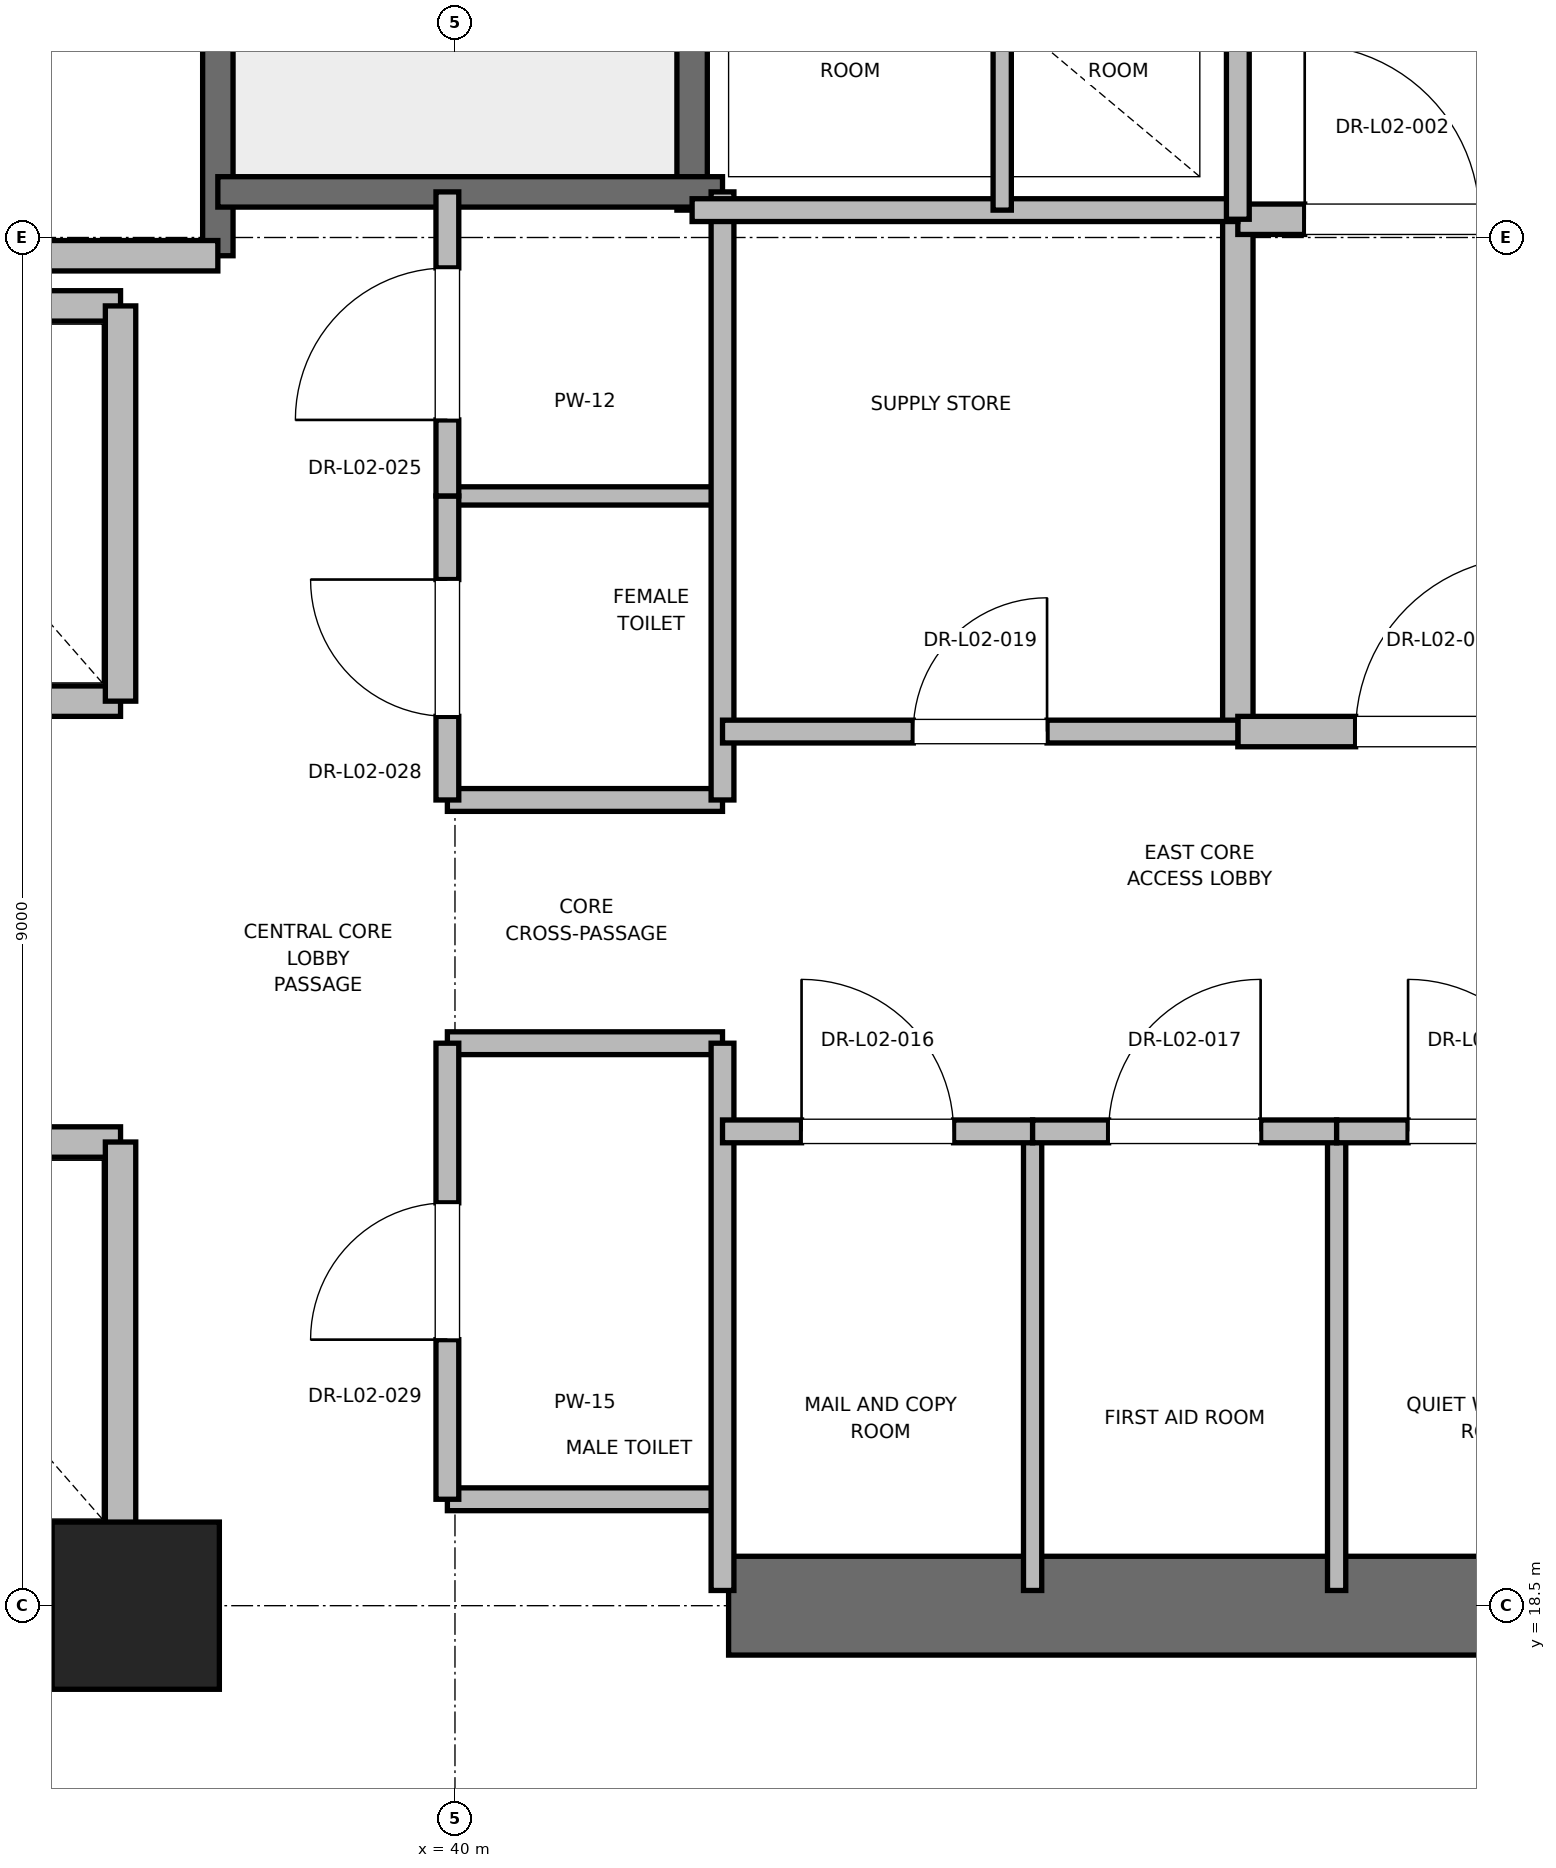
"""IFC4 building model, lengths in metres.
Left out: names, types, materials, properties, quantities, classifications, styles, units other than length and angle.
Written with IfcOpenShell. Run it as: python <this file> out.ifc"""

import sys

from ifc_helpers import new_model, si_unit, direction, frame, frame_2d, origin, origin_2d, place, context, subcontext, project, spatial, rectangle, extrude, element, fill, save


model = new_model("IFC4")
c1 = context("Model", 3, precision=1e-05, world=origin(), true_north=direction((0.0, 1.0)))
c2 = subcontext(c1, "Body", "Model", "MODEL_VIEW")
j1 = project(units=[si_unit("LENGTHUNIT", "METRE"), si_unit("PLANEANGLEUNIT", "RADIAN")], contexts=[c1])
p1 = place(None, origin())
s1 = spatial("IfcSite", under=j1, at=p1, CompositionType="ELEMENT")
p2 = place(p1, origin())
s2 = spatial("IfcBuilding", under=s1, at=p2, CompositionType="ELEMENT")
p3 = place(p2, frame((0.0, 0.0, 11.2)))
s3 = spatial("IfcBuildingStorey", under=s2, at=p3, CompositionType="ELEMENT", Elevation=11.2)
p4 = place(p3, frame((37.9, 18.5, 0.0), z_axis=(0.0, 0.0, 1.0), x_axis=(1.0, 0.0, 0.0)))
e1 = element("IfcColumn", 1, at=p4, inside=s3, PredefinedType="PILASTER", context=c2, shape_type="SweptSolid", body=[
    extrude(rectangle(XDim=1.1, YDim=1.1, at=origin_2d()), origin(), (0.0, 0.0, 1.0), 5.2),
])
for number, where, z_axis, x_axis in (
    (2, (29.0, 18.5, 0.0), (0.0, 0.0, 1.0), (1.0, 0.0, 0.0)),
    (3, (41.8, 18.5, 0.0), (0.0, 0.0, 1.0), (1.0, 0.0, 0.0)),
):
    element("IfcWall", number, at=place(p3, frame(where, z_axis=z_axis, x_axis=x_axis)), inside=s3, PredefinedType="SHEAR", context=c2, shape_type="SweptSolid", body=[
        extrude(rectangle(XDim=9.2, YDim=0.65, at=frame_2d((4.6, 0.0))), origin(), (0.0, 0.0, 1.0), 4.92),
    ])
p5 = place(p3, frame((38.44, 27.38, 0.0), z_axis=(0.0, 0.0, 1.0), x_axis=(0.0, 1.0, 0.0)))
e4 = element("IfcWall", 4, at=p5, inside=s3, PredefinedType="SOLIDWALL", context=c2, shape_type="SweptSolid", body=[
    extrude(rectangle(XDim=8.87, YDim=0.2, at=frame_2d((4.435, 0.0))), origin(), (0.0, 0.0, 1.0), 4.92),
])
p6 = place(p3, frame((41.56, 27.68, 0.0), z_axis=(0.0, 0.0, 1.0), x_axis=(0.0, 1.0, 0.0)))
e5 = element("IfcWall", 5, at=p6, inside=s3, PredefinedType="SOLIDWALL", context=c2, shape_type="SweptSolid", body=[
    extrude(rectangle(XDim=8.57, YDim=0.2, at=frame_2d((4.285, 0.0))), origin(), (0.0, 0.0, 1.0), 4.92),
])
p7 = place(p3, frame((38.44, 27.8, 0.0), z_axis=(0.0, 0.0, 1.0), x_axis=(1.0, 0.0, 0.0)))
e6 = element("IfcWall", 6, at=p7, inside=s3, PredefinedType="SOLIDWALL", context=c2, shape_type="SweptSolid", body=[
    extrude(rectangle(XDim=3.32, YDim=0.2, at=frame_2d((1.66, 0.0))), origin(), (0.0, 0.0, 1.0), 4.92),
])
p8 = place(p3, frame((32.82, 27.38, 0.0), z_axis=(0.0, 0.0, 1.0), x_axis=(1.0, 0.0, 0.0)))
e7 = element("IfcWall", 7, at=p8, inside=s3, PredefinedType="PARTITIONING", context=c2, shape_type="SweptSolid", body=[
    extrude(rectangle(XDim=5.62, YDim=0.2, at=frame_2d((2.81, 0.0))), origin(), (0.0, 0.0, 1.0), 4.92),
])
p9 = place(p3, frame((45.15, 24.25, 0.0), z_axis=(0.0, 0.0, 1.0), x_axis=(0.0, 1.0, 0.0)))
e8 = element("IfcWall", 8, at=p9, inside=s3, PredefinedType="PARTITIONING", context=c2, shape_type="SweptSolid", body=[
    extrude(rectangle(XDim=3.37, YDim=0.2, at=frame_2d((1.685, 0.0))), origin(), (0.0, 0.0, 1.0), 4.92),
])
p10 = place(p3, frame((45.15, 24.25, 0.0), z_axis=(0.0, 0.0, 1.0), x_axis=(1.0, 0.0, 0.0)))
e9 = element("IfcWall", 9, at=p10, inside=s3, PredefinedType="PARTITIONING", context=c2, shape_type="SweptSolid", body=[
    extrude(rectangle(XDim=2.7, YDim=0.2, at=frame_2d((1.35, 0.0))), origin(), (0.0, 0.0, 1.0), 4.92),
])
p11 = place(p10, frame((0.775, 0.0, 0.0)))
e10 = element("IfcOpeningElement", 10, at=p11, cuts=e9, PredefinedType="OPENING", context=c2, shape_type="SweptSolid", body=[
    extrude(rectangle(XDim=1.15, YDim=2.2, at=frame_2d((0.575, 1.1))), frame((0.0, 0.1, 0.0), z_axis=(0.0, -1.0, 0.0), x_axis=(1.0, 0.0, 0.0)), (0.0, 0.0, 1.0), 0.2),
])
p12 = place(p3, frame((45.15, 27.62, 0.0), z_axis=(0.0, 0.0, 1.0), x_axis=(1.0, 0.0, 0.0)))
e11 = element("IfcWall", 11, at=p12, inside=s3, PredefinedType="PARTITIONING", context=c2, shape_type="SweptSolid", body=[
    extrude(rectangle(XDim=2.03, YDim=0.2, at=frame_2d((1.015, 0.0))), origin(), (0.0, 0.0, 1.0), 4.92),
])
p13 = place(p12, frame((0.44, 0.0, 0.0)))
e12 = element("IfcOpeningElement", 12, at=p13, cuts=e11, PredefinedType="OPENING", context=c2, shape_type="SweptSolid", body=[
    extrude(rectangle(XDim=1.15, YDim=2.2, at=frame_2d((0.575, 1.1))), frame((0.0, 0.1, 0.0), z_axis=(0.0, -1.0, 0.0), x_axis=(1.0, 0.0, 0.0)), (0.0, 0.0, 1.0), 0.2),
])
p14 = place(p3, frame((35.5, 18.95, 0.0), z_axis=(0.0, 0.0, 1.0), x_axis=(1.0, 0.0, 0.0)))
e13 = element("IfcWall", 13, at=p14, inside=s3, PredefinedType="SOLIDWALL", context=c2, shape_type="SweptSolid", body=[
    extrude(rectangle(XDim=2.3, YDim=0.2, at=frame_2d((1.15, 0.0))), origin(), (0.0, 0.0, 1.0), 3.7),
])
p15 = place(p3, frame((37.8, 21.55, 0.0), z_axis=(0.0, 0.0, 1.0), x_axis=(-1.0, 0.0, 0.0)))
e14 = element("IfcWall", 14, at=p15, inside=s3, PredefinedType="SOLIDWALL", context=c2, shape_type="SweptSolid", body=[
    extrude(rectangle(XDim=2.3, YDim=0.2, at=frame_2d((1.15, 0.0))), origin(), (0.0, 0.0, 1.0), 4.92),
])
p16 = place(p3, frame((37.8, 18.95, 0.0), z_axis=(0.0, 0.0, 1.0), x_axis=(0.0, 1.0, 0.0)))
e15 = element("IfcWall", 15, at=p16, inside=s3, PredefinedType="SOLIDWALL", context=c2, shape_type="SweptSolid", body=[
    extrude(rectangle(XDim=2.6, YDim=0.2, at=frame_2d((1.3, 0.0))), origin(), (0.0, 0.0, 1.0), 3.7),
])
for number, where, z_axis, x_axis in (
    (16, (35.5, 24.45, 0.0), (0.0, 0.0, 1.0), (1.0, 0.0, 0.0)),
    (17, (37.8, 27.05, 0.0), (0.0, 0.0, 1.0), (-1.0, 0.0, 0.0)),
):
    element("IfcWall", number, at=place(p3, frame(where, z_axis=z_axis, x_axis=x_axis)), inside=s3, PredefinedType="SOLIDWALL", context=c2, shape_type="SweptSolid", body=[
        extrude(rectangle(XDim=2.3, YDim=0.2, at=frame_2d((1.15, 0.0))), origin(), (0.0, 0.0, 1.0), 4.92),
    ])
p17 = place(p3, frame((37.8, 24.45, 0.0), z_axis=(0.0, 0.0, 1.0), x_axis=(0.0, 1.0, 0.0)))
e18 = element("IfcWall", 18, at=p17, inside=s3, PredefinedType="SOLIDWALL", context=c2, shape_type="SweptSolid", body=[
    extrude(rectangle(XDim=2.6, YDim=0.2, at=frame_2d((1.3, 0.0))), origin(), (0.0, 0.0, 1.0), 4.92),
])
for number, where, z_axis, x_axis in (
    (19, (39.95, 19.2, 0.0), (0.0, 0.0, 1.0), (1.0, 0.0, 0.0)),
    (20, (39.95, 22.2, 0.0), (0.0, 0.0, 1.0), (1.0, 0.0, 0.0)),
    (21, (39.95, 23.8, 0.0), (0.0, 0.0, 1.0), (1.0, 0.0, 0.0)),
):
    element("IfcWall", number, at=place(p3, frame(where, z_axis=z_axis, x_axis=x_axis)), inside=s3, PredefinedType="PARTITIONING", context=c2, shape_type="SweptSolid", body=[
        extrude(rectangle(XDim=1.81, YDim=0.15, at=frame_2d((0.905, 0.0))), origin(), (0.0, 0.0, 1.0), 2.85),
    ])
p18 = place(p3, frame((39.95, 25.8, 0.0), z_axis=(0.0, 0.0, 1.0), x_axis=(1.0, 0.0, 0.0)))
e22 = element("IfcWall", 22, at=p18, inside=s3, PredefinedType="PARTITIONING", context=c2, shape_type="SweptSolid", body=[
    extrude(rectangle(XDim=1.81, YDim=0.12, at=frame_2d((0.905, 0.0))), origin(), (0.0, 0.0, 1.0), 2.85),
])
p19 = place(p3, frame((41.76, 18.6, 0.0), z_axis=(0.0, 0.0, 1.0), x_axis=(0.0, 1.0, 0.0)))
e23 = element("IfcWall", 23, at=p19, inside=s3, PredefinedType="PARTITIONING", context=c2, shape_type="SweptSolid", body=[
    extrude(rectangle(XDim=3.6, YDim=0.15, at=frame_2d((1.8, 0.0))), origin(), (0.0, 0.0, 1.0), 2.85),
])
p20 = place(p3, frame((41.76, 23.8, 0.0), z_axis=(0.0, 0.0, 1.0), x_axis=(0.0, 1.0, 0.0)))
e24 = element("IfcWall", 24, at=p20, inside=s3, PredefinedType="PARTITIONING", context=c2, shape_type="SweptSolid", body=[
    extrude(rectangle(XDim=4.0, YDim=0.15, at=frame_2d((2.0, 0.0))), origin(), (0.0, 0.0, 1.0), 2.85),
])
p21 = place(p3, frame((39.95, 19.2, 0.0), z_axis=(0.0, 0.0, 1.0), x_axis=(0.0, 1.0, 0.0)))
e25 = element("IfcWall", 25, at=p21, inside=s3, PredefinedType="PARTITIONING", context=c2, shape_type="SweptSolid", body=[
    extrude(rectangle(XDim=3.0, YDim=0.15, at=frame_2d((1.5, 0.0))), origin(), (0.0, 0.0, 1.0), 2.85),
])
p22 = place(p21, frame((1.05, 0.0, 0.0)))
e26 = element("IfcOpeningElement", 26, at=p22, cuts=e25, PredefinedType="OPENING", context=c2, shape_type="SweptSolid", body=[
    extrude(rectangle(XDim=0.9, YDim=2.1, at=frame_2d((0.45, 1.05))), frame((0.0, 0.075, 0.0), z_axis=(0.0, -1.0, 0.0), x_axis=(1.0, 0.0, 0.0)), (0.0, 0.0, 1.0), 0.15),
])
p23 = place(p3, frame((39.95, 23.8, 0.0), z_axis=(0.0, 0.0, 1.0), x_axis=(0.0, 1.0, 0.0)))
e27 = element("IfcWall", 27, at=p23, inside=s3, PredefinedType="PARTITIONING", context=c2, shape_type="SweptSolid", body=[
    extrude(rectangle(XDim=2.0, YDim=0.15, at=frame_2d((1.0, 0.0))), origin(), (0.0, 0.0, 1.0), 2.85),
])
p24 = place(p23, frame((0.55, 0.0, 0.0)))
e28 = element("IfcOpeningElement", 28, at=p24, cuts=e27, PredefinedType="OPENING", context=c2, shape_type="SweptSolid", body=[
    extrude(rectangle(XDim=0.9, YDim=2.1, at=frame_2d((0.45, 1.05))), frame((0.0, 0.075, 0.0), z_axis=(0.0, -1.0, 0.0), x_axis=(1.0, 0.0, 0.0)), (0.0, 0.0, 1.0), 0.15),
])
p25 = place(p3, frame((39.95, 25.8, 0.0), z_axis=(0.0, 0.0, 1.0), x_axis=(0.0, 1.0, 0.0)))
e29 = element("IfcWall", 29, at=p25, inside=s3, PredefinedType="PARTITIONING", context=c2, shape_type="SweptSolid", body=[
    extrude(rectangle(XDim=2.0, YDim=0.15, at=frame_2d((1.0, 0.0))), origin(), (0.0, 0.0, 1.0), 2.85),
])
p26 = place(p25, frame((0.5, 0.0, 0.0)))
e30 = element("IfcOpeningElement", 30, at=p26, cuts=e29, PredefinedType="OPENING", context=c2, shape_type="SweptSolid", body=[
    extrude(rectangle(XDim=1.0, YDim=2.15, at=frame_2d((0.5, 1.075))), frame((0.0, 0.075, 0.0), z_axis=(0.0, -1.0, 0.0), x_axis=(1.0, 0.0, 0.0)), (0.0, 0.0, 1.0), 0.15),
])
p27 = place(p3, frame((41.56, 27.68, 0.0), z_axis=(0.0, 0.0, 1.0), x_axis=(1.0, 0.0, 0.0)))
e31 = element("IfcWall", 31, at=p27, inside=s3, PredefinedType="PARTITIONING", context=c2, shape_type="SweptSolid", body=[
    extrude(rectangle(XDim=3.59, YDim=0.15, at=frame_2d((1.795, 0.0))), origin(), (0.0, 0.0, 1.0), 2.85),
])
for number, where, z_axis, x_axis in (
    (32, (43.8, 18.6, 0.0), (0.0, 0.0, 1.0), (0.0, 1.0, 0.0)),
    (33, (45.8, 18.6, 0.0), (0.0, 0.0, 1.0), (0.0, 1.0, 0.0)),
):
    element("IfcWall", number, at=place(p3, frame(where, z_axis=z_axis, x_axis=x_axis)), inside=s3, PredefinedType="PARTITIONING", context=c2, shape_type="SweptSolid", body=[
        extrude(rectangle(XDim=3.02, YDim=0.12, at=frame_2d((1.51, 0.0))), origin(), (0.0, 0.0, 1.0), 2.85),
    ])
p28 = place(p3, frame((41.76, 21.62, 0.0), z_axis=(0.0, 0.0, 1.0), x_axis=(1.0, 0.0, 0.0)))
e34 = element("IfcWall", 34, at=p28, inside=s3, PredefinedType="PARTITIONING", context=c2, shape_type="SweptSolid", body=[
    extrude(rectangle(XDim=2.04, YDim=0.15, at=frame_2d((1.02, 0.0))), origin(), (0.0, 0.0, 1.0), 2.85),
])
p29 = place(p28, frame((0.52, 0.0, 0.0)))
e35 = element("IfcOpeningElement", 35, at=p29, cuts=e34, PredefinedType="OPENING", context=c2, shape_type="SweptSolid", body=[
    extrude(rectangle(XDim=1.0, YDim=2.15, at=frame_2d((0.5, 1.075))), frame((0.0, 0.075, 0.0), z_axis=(0.0, -1.0, 0.0), x_axis=(1.0, 0.0, 0.0)), (0.0, 0.0, 1.0), 0.15),
])
p30 = place(p3, frame((43.8, 21.62, 0.0), z_axis=(0.0, 0.0, 1.0), x_axis=(1.0, 0.0, 0.0)))
e36 = element("IfcWall", 36, at=p30, inside=s3, PredefinedType="PARTITIONING", context=c2, shape_type="SweptSolid", body=[
    extrude(rectangle(XDim=2.0, YDim=0.15, at=frame_2d((1.0, 0.0))), origin(), (0.0, 0.0, 1.0), 2.85),
])
p31 = place(p30, frame((0.5, 0.0, 0.0)))
e37 = element("IfcOpeningElement", 37, at=p31, cuts=e36, PredefinedType="OPENING", context=c2, shape_type="SweptSolid", body=[
    extrude(rectangle(XDim=1.0, YDim=2.15, at=frame_2d((0.5, 1.075))), frame((0.0, 0.075, 0.0), z_axis=(0.0, -1.0, 0.0), x_axis=(1.0, 0.0, 0.0)), (0.0, 0.0, 1.0), 0.15),
])
p32 = place(p3, frame((45.8, 21.62, 0.0), z_axis=(0.0, 0.0, 1.0), x_axis=(1.0, 0.0, 0.0)))
e38 = element("IfcWall", 38, at=p32, inside=s3, PredefinedType="PARTITIONING", context=c2, shape_type="SweptSolid", body=[
    extrude(rectangle(XDim=1.94, YDim=0.15, at=frame_2d((0.97, 0.0))), origin(), (0.0, 0.0, 1.0), 2.85),
])
p33 = place(p32, frame((0.47, 0.0, 0.0)))
e39 = element("IfcOpeningElement", 39, at=p33, cuts=e38, PredefinedType="OPENING", context=c2, shape_type="SweptSolid", body=[
    extrude(rectangle(XDim=1.0, YDim=2.15, at=frame_2d((0.5, 1.075))), frame((0.0, 0.075, 0.0), z_axis=(0.0, -1.0, 0.0), x_axis=(1.0, 0.0, 0.0)), (0.0, 0.0, 1.0), 0.15),
])
p34 = place(p3, frame((41.76, 24.25, 0.0), z_axis=(0.0, 0.0, 1.0), x_axis=(1.0, 0.0, 0.0)))
e40 = element("IfcWall", 40, at=p34, inside=s3, PredefinedType="PARTITIONING", context=c2, shape_type="SweptSolid", body=[
    extrude(rectangle(XDim=3.39, YDim=0.15, at=frame_2d((1.695, 0.0))), origin(), (0.0, 0.0, 1.0), 2.85),
])
p35 = place(p34, frame((1.255, 0.0, 0.0)))
e41 = element("IfcOpeningElement", 41, at=p35, cuts=e40, PredefinedType="OPENING", context=c2, shape_type="SweptSolid", body=[
    extrude(rectangle(XDim=0.88, YDim=2.1, at=frame_2d((0.44, 1.05))), frame((0.0, 0.075, 0.0), z_axis=(0.0, -1.0, 0.0), x_axis=(1.0, 0.0, 0.0)), (0.0, 0.0, 1.0), 0.15),
])
p36 = place(p3, frame((45.15, 27.62, 0.0), z_axis=(0.0, 0.0, 1.0), x_axis=(0.0, 1.0, 0.0)))
e42 = element("IfcWall", 42, at=p36, inside=s3, PredefinedType="PARTITIONING", context=c2, shape_type="SweptSolid", body=[
    extrude(rectangle(XDim=3.1, YDim=0.15, at=frame_2d((1.55, 0.0))), origin(), (0.0, 0.0, 1.0), 2.85),
])
p37 = place(p3, frame((43.6, 27.68, 0.0), z_axis=(0.0, 0.0, 1.0), x_axis=(0.0, 1.0, 0.0)))
e43 = element("IfcWall", 43, at=p37, inside=s3, PredefinedType="PARTITIONING", context=c2, shape_type="SweptSolid", body=[
    extrude(rectangle(XDim=3.04, YDim=0.12, at=frame_2d((1.52, 0.0))), origin(), (0.0, 0.0, 1.0), 2.85),
])
p38 = place(p11, origin())
e44 = element("IfcDoor", 44, at=p38, inside=s3, OperationType="SINGLE_SWING_RIGHT", PredefinedType="DOOR", context=c2, shape_type="SweptSolid", body=[
    extrude(rectangle(XDim=1.15, YDim=2.2, at=frame_2d((0.575, 1.1))), frame((0.0, 0.025, 0.0), z_axis=(0.0, -1.0, 0.0), x_axis=(1.0, 0.0, 0.0)), (0.0, 0.0, 1.0), 0.05),
])
fill(e10, e44)
p39 = place(p13, origin())
e45 = element("IfcDoor", 45, at=p39, inside=s3, OperationType="SINGLE_SWING_LEFT", PredefinedType="DOOR", context=c2, shape_type="SweptSolid", body=[
    extrude(rectangle(XDim=1.15, YDim=2.2, at=frame_2d((0.575, 1.1))), frame((0.0, 0.025, 0.0), z_axis=(0.0, -1.0, 0.0), x_axis=(1.0, 0.0, 0.0)), (0.0, 0.0, 1.0), 0.05),
])
fill(e12, e45)
p40 = place(p22, origin())
e46 = element("IfcDoor", 46, at=p40, inside=s3, OperationType="SINGLE_SWING_LEFT", PredefinedType="DOOR", context=c2, shape_type="SweptSolid", body=[
    extrude(rectangle(XDim=0.9, YDim=2.1, at=frame_2d((0.45, 1.05))), frame((0.0, 0.025, 0.0), z_axis=(0.0, -1.0, 0.0), x_axis=(1.0, 0.0, 0.0)), (0.0, 0.0, 1.0), 0.05),
])
fill(e26, e46)
p41 = place(p24, origin())
e47 = element("IfcDoor", 47, at=p41, inside=s3, OperationType="SINGLE_SWING_RIGHT", PredefinedType="DOOR", context=c2, shape_type="SweptSolid", body=[
    extrude(rectangle(XDim=0.9, YDim=2.1, at=frame_2d((0.45, 1.05))), frame((0.0, 0.025, 0.0), z_axis=(0.0, -1.0, 0.0), x_axis=(1.0, 0.0, 0.0)), (0.0, 0.0, 1.0), 0.05),
])
fill(e28, e47)
p42 = place(p26, origin())
e48 = element("IfcDoor", 48, at=p42, inside=s3, OperationType="SINGLE_SWING_LEFT", PredefinedType="DOOR", context=c2, shape_type="SweptSolid", body=[
    extrude(rectangle(XDim=1.0, YDim=2.15, at=frame_2d((0.5, 1.075))), frame((0.0, 0.025, 0.0), z_axis=(0.0, -1.0, 0.0), x_axis=(1.0, 0.0, 0.0)), (0.0, 0.0, 1.0), 0.05),
])
fill(e30, e48)
p43 = place(p29, origin())
e49 = element("IfcDoor", 49, at=p43, inside=s3, OperationType="SINGLE_SWING_LEFT", PredefinedType="DOOR", context=c2, shape_type="SweptSolid", body=[
    extrude(rectangle(XDim=1.0, YDim=2.15, at=frame_2d((0.5, 1.075))), frame((0.0, 0.025, 0.0), z_axis=(0.0, -1.0, 0.0), x_axis=(1.0, 0.0, 0.0)), (0.0, 0.0, 1.0), 0.05),
])
fill(e35, e49)
p44 = place(p31, origin())
e50 = element("IfcDoor", 50, at=p44, inside=s3, OperationType="SINGLE_SWING_RIGHT", PredefinedType="DOOR", context=c2, shape_type="SweptSolid", body=[
    extrude(rectangle(XDim=1.0, YDim=2.15, at=frame_2d((0.5, 1.075))), frame((0.0, 0.025, 0.0), z_axis=(0.0, -1.0, 0.0), x_axis=(1.0, 0.0, 0.0)), (0.0, 0.0, 1.0), 0.05),
])
fill(e37, e50)
p45 = place(p33, origin())
e51 = element("IfcDoor", 51, at=p45, inside=s3, OperationType="SINGLE_SWING_LEFT", PredefinedType="DOOR", context=c2, shape_type="SweptSolid", body=[
    extrude(rectangle(XDim=1.0, YDim=2.15, at=frame_2d((0.5, 1.075))), frame((0.0, 0.025, 0.0), z_axis=(0.0, -1.0, 0.0), x_axis=(1.0, 0.0, 0.0)), (0.0, 0.0, 1.0), 0.05),
])
fill(e39, e51)
p46 = place(p35, origin())
e52 = element("IfcDoor", 52, at=p46, inside=s3, OperationType="SINGLE_SWING_RIGHT", PredefinedType="DOOR", context=c2, shape_type="SweptSolid", body=[
    extrude(rectangle(XDim=0.88, YDim=2.1, at=frame_2d((0.44, 1.05))), frame((0.0, 0.025, 0.0), z_axis=(0.0, -1.0, 0.0), x_axis=(1.0, 0.0, 0.0)), (0.0, 0.0, 1.0), 0.05),
])
fill(e41, e52)
save(model, sys.argv[1])
